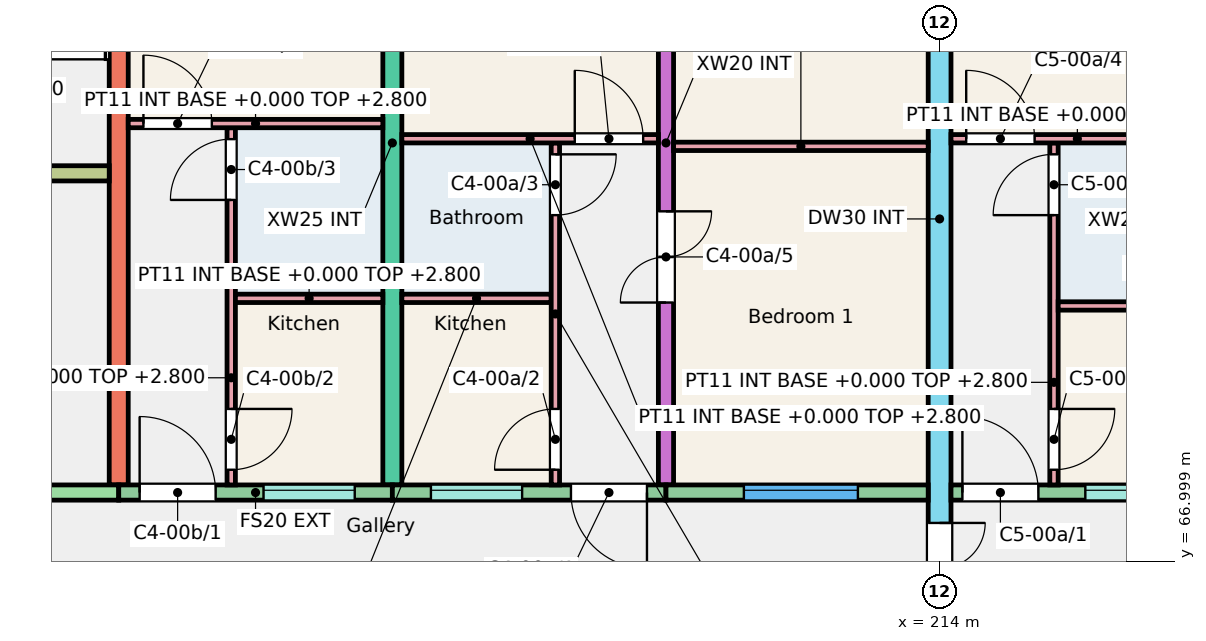
"""IFC4 building model, lengths in metres.
Left out: names, types, materials, properties, quantities, classifications, styles, units other than length and angle.
Written with IfcOpenShell. Run it as: python <this file> out.ifc"""

import sys

from ifc_helpers import new_model, si_unit, direction, frame, frame_2d, origin, place, context, subcontext, project, spatial, rectangle, extrude, element, fill, save


model = new_model("IFC4")
c1 = context("Model", 3, precision=1e-05, world=origin(), true_north=direction((0.0, 1.0)))
c2 = subcontext(c1, "Body", "Model", "MODEL_VIEW")
j1 = project(units=[si_unit("LENGTHUNIT", "METRE"), si_unit("PLANEANGLEUNIT", "RADIAN")], contexts=[c1])
p1 = place(None, origin())
s1 = spatial("IfcSite", under=j1, at=p1, CompositionType="ELEMENT")
p2 = place(p1, origin())
s2 = spatial("IfcBuilding", under=s1, at=p2, CompositionType="ELEMENT")
p3 = place(p2, origin())
s3 = spatial("IfcBuildingStorey", under=s2, at=p3, CompositionType="ELEMENT", Elevation=0.0)
for number, where, z_axis, x_axis in (
    (1, (203.2, 68.0, -0.25), (0.0, 0.0, 1.0), (0.0, 1.0, 0.0)),
    (2, (206.8, 68.0, -0.25), (0.0, 0.0, 1.0), (0.0, 1.0, 0.0)),
):
    element("IfcWall", number, at=place(p3, frame(where, z_axis=z_axis, x_axis=x_axis)), inside=s3, PredefinedType="SHEAR", context=c2, shape_type="SweptSolid", body=[
        extrude(rectangle(XDim=9.0, YDim=0.25, at=frame_2d((4.5, 0.0))), origin(), (0.0, 0.0, 1.0), 3.25),
    ])
p4 = place(p3, frame((210.4, 68.0, -0.25), z_axis=(0.0, 0.0, 1.0), x_axis=(0.0, 1.0, 0.0)))
e3 = element("IfcWall", 3, at=p4, inside=s3, PredefinedType="SHEAR", context=c2, shape_type="SweptSolid", body=[
    extrude(rectangle(XDim=9.0, YDim=0.2, at=frame_2d((4.5, 0.0))), origin(), (0.0, 0.0, 1.0), 3.25),
])
p5 = place(p4, frame((2.4, 0.0, 0.25)))
e4 = element("IfcOpeningElement", 4, at=p5, cuts=e3, PredefinedType="OPENING", context=c2, shape_type="SweptSolid", body=[
    extrude(rectangle(XDim=1.2, YDim=2.1, at=frame_2d((0.6, 1.05))), frame((0.0, 0.11, 0.0), z_axis=(0.0, -1.0, 0.0), x_axis=(1.0, 0.0, 0.0)), (0.0, 0.0, 1.0), 0.22),
])
p6 = place(p4, frame((6.4, 0.0, 0.25)))
e5 = element("IfcOpeningElement", 5, at=p6, cuts=e3, PredefinedType="OPENING", context=c2, shape_type="SweptSolid", body=[
    extrude(rectangle(XDim=1.2, YDim=2.1, at=frame_2d((0.6, 1.05))), frame((0.0, 0.11, 0.0), z_axis=(0.0, -1.0, 0.0), x_axis=(1.0, 0.0, 0.0)), (0.0, 0.0, 1.0), 0.22),
])
p7 = place(p3, frame((214.0, 66.0, -0.25), z_axis=(0.0, 0.0, 1.0), x_axis=(0.0, 1.0, 0.0)))
e6 = element("IfcWall", 6, at=p7, inside=s3, PredefinedType="SHEAR", context=c2, shape_type="SweptSolid", body=[
    extrude(rectangle(XDim=11.0, YDim=0.3, at=frame_2d((5.5, 0.0))), origin(), (0.0, 0.0, 1.0), 3.25),
])
p8 = place(p7, frame((0.3, 0.0, 0.25)))
e7 = element("IfcOpeningElement", 7, at=p8, cuts=e6, PredefinedType="OPENING", context=c2, shape_type="SweptSolid", body=[
    extrude(rectangle(XDim=1.2, YDim=2.1, at=frame_2d((0.6, 1.05))), frame((0.0, 0.16, 0.0), z_axis=(0.0, -1.0, 0.0), x_axis=(1.0, 0.0, 0.0)), (0.0, 0.0, 1.0), 0.32),
])
p9 = place(p3, frame((197.35, 67.9, -0.25), z_axis=(0.0, 0.0, 1.0), x_axis=(1.0, 0.0, 0.0)))
e8 = element("IfcWall", 8, at=p9, inside=s3, PredefinedType="SHEAR", context=c2, shape_type="SweptSolid", body=[
    extrude(rectangle(XDim=5.85, YDim=0.2, at=frame_2d((2.925, 0.0))), origin(), (0.0, 0.0, 1.0), 3.25),
])
p10 = place(p9, frame((2.312, 0.0, 0.25)))
e9 = element("IfcOpeningElement", 9, at=p10, cuts=e8, PredefinedType="OPENING", context=c2, shape_type="SweptSolid", body=[
    extrude(rectangle(XDim=1.1, YDim=2.1, at=frame_2d((0.55, 1.05))), frame((0.0, 0.11, 0.0), z_axis=(0.0, -1.0, 0.0), x_axis=(1.0, 0.0, 0.0)), (0.0, 0.0, 1.0), 0.22),
])
p11 = place(p3, frame((197.35, 72.1, -0.25), z_axis=(0.0, 0.0, 1.0), x_axis=(1.0, 0.0, 0.0)))
e10 = element("IfcWall", 10, at=p11, inside=s3, PredefinedType="SHEAR", context=c2, shape_type="SweptSolid", body=[
    extrude(rectangle(XDim=5.725, YDim=0.2, at=frame_2d((2.862, 0.0))), origin(), (0.0, 0.0, 1.0), 3.25),
])
p12 = place(p11, frame((3.775, 0.0, 0.25)))
e11 = element("IfcOpeningElement", 11, at=p12, cuts=e10, PredefinedType="OPENING", context=c2, shape_type="SweptSolid", body=[
    extrude(rectangle(XDim=1.0, YDim=2.1, at=frame_2d((0.5, 1.05))), frame((0.0, 0.11, 0.0), z_axis=(0.0, -1.0, 0.0), x_axis=(1.0, 0.0, 0.0)), (0.0, 0.0, 1.0), 0.22),
])
p13 = place(p11, frame((0.762, 0.0, 0.25)))
e12 = element("IfcOpeningElement", 12, at=p13, cuts=e10, PredefinedType="OPENING", context=c2, shape_type="SweptSolid", body=[
    extrude(rectangle(XDim=1.1, YDim=2.1, at=frame_2d((0.55, 1.05))), frame((0.0, 0.11, 0.0), z_axis=(0.0, -1.0, 0.0), x_axis=(1.0, 0.0, 0.0)), (0.0, 0.0, 1.0), 0.22),
])
p14 = place(p3, frame((203.2, 67.9, -0.25), z_axis=(0.0, 0.0, 1.0), x_axis=(1.0, 0.0, 0.0)))
e13 = element("IfcWall", 13, at=p14, inside=s3, PredefinedType="SOLIDWALL", context=c2, shape_type="SweptSolid", body=[
    extrude(rectangle(XDim=3.6, YDim=0.2, at=frame_2d((1.8, 0.0))), origin(), (0.0, 0.0, 1.0), 3.25),
])
p15 = place(p14, frame((1.905, 0.0, 1.35)))
e14 = element("IfcOpeningElement", 14, at=p15, cuts=e13, PredefinedType="OPENING", context=c2, shape_type="SweptSolid", body=[
    extrude(rectangle(XDim=1.2, YDim=1.3, at=frame_2d((0.6, 0.65))), frame((0.0, 0.11, 0.0), z_axis=(0.0, -1.0, 0.0), x_axis=(1.0, 0.0, 0.0)), (0.0, 0.0, 1.0), 0.22),
])
p16 = place(p14, frame((0.275, 0.0, 0.25)))
e15 = element("IfcOpeningElement", 15, at=p16, cuts=e13, PredefinedType="OPENING", context=c2, shape_type="SweptSolid", body=[
    extrude(rectangle(XDim=1.0, YDim=2.1, at=frame_2d((0.5, 1.05))), frame((0.0, 0.11, 0.0), z_axis=(0.0, -1.0, 0.0), x_axis=(1.0, 0.0, 0.0)), (0.0, 0.0, 1.0), 0.22),
])
p17 = place(p3, frame((206.8, 67.9, -0.25), z_axis=(0.0, 0.0, 1.0), x_axis=(1.0, 0.0, 0.0)))
e16 = element("IfcWall", 16, at=p17, inside=s3, PredefinedType="SOLIDWALL", context=c2, shape_type="SweptSolid", body=[
    extrude(rectangle(XDim=3.6, YDim=0.2, at=frame_2d((1.8, 0.0))), origin(), (0.0, 0.0, 1.0), 3.25),
])
p18 = place(p17, frame((0.508, 0.0, 1.35)))
e17 = element("IfcOpeningElement", 17, at=p18, cuts=e16, PredefinedType="OPENING", context=c2, shape_type="SweptSolid", body=[
    extrude(rectangle(XDim=1.2, YDim=1.3, at=frame_2d((0.6, 0.65))), frame((0.0, 0.11, 0.0), z_axis=(0.0, -1.0, 0.0), x_axis=(1.0, 0.0, 0.0)), (0.0, 0.0, 1.0), 0.22),
])
p19 = place(p17, frame((2.35, 0.0, 0.25)))
e18 = element("IfcOpeningElement", 18, at=p19, cuts=e16, PredefinedType="OPENING", context=c2, shape_type="SweptSolid", body=[
    extrude(rectangle(XDim=1.0, YDim=2.1, at=frame_2d((0.5, 1.05))), frame((0.0, 0.11, 0.0), z_axis=(0.0, -1.0, 0.0), x_axis=(1.0, 0.0, 0.0)), (0.0, 0.0, 1.0), 0.22),
])
p20 = place(p3, frame((210.4, 67.9, -0.25), z_axis=(0.0, 0.0, 1.0), x_axis=(1.0, 0.0, 0.0)))
e19 = element("IfcWall", 19, at=p20, inside=s3, PredefinedType="SOLIDWALL", context=c2, shape_type="SweptSolid", body=[
    extrude(rectangle(XDim=3.45, YDim=0.2, at=frame_2d((1.725, 0.0))), origin(), (0.0, 0.0, 1.0), 3.25),
])
p21 = place(p20, frame((1.025, 0.0, 1.15)))
e20 = element("IfcOpeningElement", 20, at=p21, cuts=e19, PredefinedType="OPENING", context=c2, shape_type="SweptSolid", body=[
    extrude(rectangle(XDim=1.5, YDim=1.5, at=frame_2d((0.75, 0.75))), frame((0.0, 0.11, 0.0), z_axis=(0.0, -1.0, 0.0), x_axis=(1.0, 0.0, 0.0)), (0.0, 0.0, 1.0), 0.22),
])
p22 = place(p3, frame((214.15, 67.9, -0.25), z_axis=(0.0, 0.0, 1.0), x_axis=(1.0, 0.0, 0.0)))
e21 = element("IfcWall", 21, at=p22, inside=s3, PredefinedType="SOLIDWALL", context=c2, shape_type="SweptSolid", body=[
    extrude(rectangle(XDim=3.45, YDim=0.2, at=frame_2d((1.725, 0.0))), origin(), (0.0, 0.0, 1.0), 3.25),
])
p23 = place(p22, frame((1.768, 0.0, 1.35)))
e22 = element("IfcOpeningElement", 22, at=p23, cuts=e21, PredefinedType="OPENING", context=c2, shape_type="SweptSolid", body=[
    extrude(rectangle(XDim=1.2, YDim=1.3, at=frame_2d((0.6, 0.65))), frame((0.0, 0.11, 0.0), z_axis=(0.0, -1.0, 0.0), x_axis=(1.0, 0.0, 0.0)), (0.0, 0.0, 1.0), 0.22),
])
p24 = place(p22, frame((0.15, 0.0, 0.25)))
e23 = element("IfcOpeningElement", 23, at=p24, cuts=e21, PredefinedType="OPENING", context=c2, shape_type="SweptSolid", body=[
    extrude(rectangle(XDim=1.0, YDim=2.1, at=frame_2d((0.5, 1.05))), frame((0.0, 0.11, 0.0), z_axis=(0.0, -1.0, 0.0), x_axis=(1.0, 0.0, 0.0)), (0.0, 0.0, 1.0), 0.22),
])
p25 = place(p3, frame((206.925, 70.455, 0.0), z_axis=(0.0, 0.0, 1.0), x_axis=(1.0, 0.0, 0.0)))
e24 = element("IfcWall", 24, at=p25, inside=s3, PredefinedType="PARTITIONING", context=c2, shape_type="SweptSolid", body=[
    extrude(rectangle(XDim=1.965, YDim=0.11, at=frame_2d((0.982, 0.0))), origin(), (0.0, 0.0, 1.0), 2.8),
])
p26 = place(p3, frame((208.945, 68.0, 0.0), z_axis=(0.0, 0.0, 1.0), x_axis=(0.0, 1.0, 0.0)))
e25 = element("IfcWall", 25, at=p26, inside=s3, PredefinedType="PARTITIONING", context=c2, shape_type="SweptSolid", body=[
    extrude(rectangle(XDim=4.5, YDim=0.11, at=frame_2d((2.25, 0.0))), origin(), (0.0, 0.0, 1.0), 2.8),
])
p27 = place(p26, frame((0.2, 0.0, 0.0)))
e26 = element("IfcOpeningElement", 26, at=p27, cuts=e25, PredefinedType="OPENING", context=c2, shape_type="SweptSolid", body=[
    extrude(rectangle(XDim=0.8, YDim=2.1, at=frame_2d((0.4, 1.05))), frame((0.0, 0.065, 0.0), z_axis=(0.0, -1.0, 0.0), x_axis=(1.0, 0.0, 0.0)), (0.0, 0.0, 1.0), 0.13),
])
p28 = place(p26, frame((3.55, 0.0, 0.0)))
e27 = element("IfcOpeningElement", 27, at=p28, cuts=e25, PredefinedType="OPENING", context=c2, shape_type="SweptSolid", body=[
    extrude(rectangle(XDim=0.8, YDim=2.1, at=frame_2d((0.4, 1.05))), frame((0.0, 0.065, 0.0), z_axis=(0.0, -1.0, 0.0), x_axis=(1.0, 0.0, 0.0)), (0.0, 0.0, 1.0), 0.13),
])
p29 = place(p3, frame((206.925, 72.555, 0.0), z_axis=(0.0, 0.0, 1.0), x_axis=(1.0, 0.0, 0.0)))
e28 = element("IfcWall", 28, at=p29, inside=s3, PredefinedType="PARTITIONING", context=c2, shape_type="SweptSolid", body=[
    extrude(rectangle(XDim=3.375, YDim=0.11, at=frame_2d((1.688, 0.0))), origin(), (0.0, 0.0, 1.0), 2.8),
])
p30 = place(p29, frame((2.275, 0.0, 0.0)))
e29 = element("IfcOpeningElement", 29, at=p30, cuts=e28, PredefinedType="OPENING", context=c2, shape_type="SweptSolid", body=[
    extrude(rectangle(XDim=0.9, YDim=2.1, at=frame_2d((0.45, 1.05))), frame((0.0, 0.065, 0.0), z_axis=(0.0, -1.0, 0.0), x_axis=(1.0, 0.0, 0.0)), (0.0, 0.0, 1.0), 0.13),
])
p31 = place(p3, frame((210.5, 72.455, 0.0), z_axis=(0.0, 0.0, 1.0), x_axis=(1.0, 0.0, 0.0)))
e30 = element("IfcWall", 30, at=p31, inside=s3, PredefinedType="PARTITIONING", context=c2, shape_type="SweptSolid", body=[
    extrude(rectangle(XDim=3.35, YDim=0.11, at=frame_2d((1.675, 0.0))), origin(), (0.0, 0.0, 1.0), 2.8),
])
p32 = place(p3, frame((204.68, 68.0, 0.0), z_axis=(0.0, 0.0, 1.0), x_axis=(0.0, 1.0, 0.0)))
e31 = element("IfcWall", 31, at=p32, inside=s3, PredefinedType="PARTITIONING", context=c2, shape_type="SweptSolid", body=[
    extrude(rectangle(XDim=4.7, YDim=0.11, at=frame_2d((2.35, 0.0))), origin(), (0.0, 0.0, 1.0), 2.8),
])
p33 = place(p32, frame((0.2, 0.0, 0.0)))
e32 = element("IfcOpeningElement", 32, at=p33, cuts=e31, PredefinedType="OPENING", context=c2, shape_type="SweptSolid", body=[
    extrude(rectangle(XDim=0.8, YDim=2.1, at=frame_2d((0.4, 1.05))), frame((0.0, 0.065, 0.0), z_axis=(0.0, -1.0, 0.0), x_axis=(1.0, 0.0, 0.0)), (0.0, 0.0, 1.0), 0.13),
])
p34 = place(p32, frame((3.75, 0.0, 0.0)))
e33 = element("IfcOpeningElement", 33, at=p34, cuts=e31, PredefinedType="OPENING", context=c2, shape_type="SweptSolid", body=[
    extrude(rectangle(XDim=0.8, YDim=2.1, at=frame_2d((0.4, 1.05))), frame((0.0, 0.065, 0.0), z_axis=(0.0, -1.0, 0.0), x_axis=(1.0, 0.0, 0.0)), (0.0, 0.0, 1.0), 0.13),
])
p35 = place(p3, frame((204.735, 70.455, 0.0), z_axis=(0.0, 0.0, 1.0), x_axis=(1.0, 0.0, 0.0)))
e34 = element("IfcWall", 34, at=p35, inside=s3, PredefinedType="PARTITIONING", context=c2, shape_type="SweptSolid", body=[
    extrude(rectangle(XDim=1.94, YDim=0.11, at=frame_2d((0.97, 0.0))), origin(), (0.0, 0.0, 1.0), 2.8),
])
p36 = place(p3, frame((203.325, 72.755, 0.0), z_axis=(0.0, 0.0, 1.0), x_axis=(1.0, 0.0, 0.0)))
e35 = element("IfcWall", 35, at=p36, inside=s3, PredefinedType="PARTITIONING", context=c2, shape_type="SweptSolid", body=[
    extrude(rectangle(XDim=3.35, YDim=0.11, at=frame_2d((1.675, 0.0))), origin(), (0.0, 0.0, 1.0), 2.8),
])
p37 = place(p36, frame((0.2, 0.0, 0.0)))
e36 = element("IfcOpeningElement", 36, at=p37, cuts=e35, PredefinedType="OPENING", context=c2, shape_type="SweptSolid", body=[
    extrude(rectangle(XDim=0.9, YDim=2.1, at=frame_2d((0.45, 1.05))), frame((0.0, 0.065, 0.0), z_axis=(0.0, -1.0, 0.0), x_axis=(1.0, 0.0, 0.0)), (0.0, 0.0, 1.0), 0.13),
])
p38 = place(p3, frame((215.505, 68.0, 0.0), z_axis=(0.0, 0.0, 1.0), x_axis=(0.0, 1.0, 0.0)))
e37 = element("IfcWall", 37, at=p38, inside=s3, PredefinedType="PARTITIONING", context=c2, shape_type="SweptSolid", body=[
    extrude(rectangle(XDim=4.5, YDim=0.11, at=frame_2d((2.25, 0.0))), origin(), (0.0, 0.0, 1.0), 2.8),
])
p39 = place(p38, frame((0.2, 0.0, 0.0)))
e38 = element("IfcOpeningElement", 38, at=p39, cuts=e37, PredefinedType="OPENING", context=c2, shape_type="SweptSolid", body=[
    extrude(rectangle(XDim=0.8, YDim=2.1, at=frame_2d((0.4, 1.05))), frame((0.0, 0.065, 0.0), z_axis=(0.0, -1.0, 0.0), x_axis=(1.0, 0.0, 0.0)), (0.0, 0.0, 1.0), 0.13),
])
p40 = place(p38, frame((3.55, 0.0, 0.0)))
e39 = element("IfcOpeningElement", 39, at=p40, cuts=e37, PredefinedType="OPENING", context=c2, shape_type="SweptSolid", body=[
    extrude(rectangle(XDim=0.8, YDim=2.1, at=frame_2d((0.4, 1.05))), frame((0.0, 0.065, 0.0), z_axis=(0.0, -1.0, 0.0), x_axis=(1.0, 0.0, 0.0)), (0.0, 0.0, 1.0), 0.13),
])
p41 = place(p3, frame((215.56, 70.355, 0.0), z_axis=(0.0, 0.0, 1.0), x_axis=(1.0, 0.0, 0.0)))
e40 = element("IfcWall", 40, at=p41, inside=s3, PredefinedType="PARTITIONING", context=c2, shape_type="SweptSolid", body=[
    extrude(rectangle(XDim=1.915, YDim=0.11, at=frame_2d((0.958, 0.0))), origin(), (0.0, 0.0, 1.0), 2.8),
])
p42 = place(p3, frame((214.15, 72.555, 0.0), z_axis=(0.0, 0.0, 1.0), x_axis=(1.0, 0.0, 0.0)))
e41 = element("IfcWall", 41, at=p42, inside=s3, PredefinedType="PARTITIONING", context=c2, shape_type="SweptSolid", body=[
    extrude(rectangle(XDim=3.325, YDim=0.11, at=frame_2d((1.663, 0.0))), origin(), (0.0, 0.0, 1.0), 2.8),
])
p43 = place(p42, frame((0.2, 0.0, 0.0)))
e42 = element("IfcOpeningElement", 42, at=p43, cuts=e41, PredefinedType="OPENING", context=c2, shape_type="SweptSolid", body=[
    extrude(rectangle(XDim=0.9, YDim=2.1, at=frame_2d((0.45, 1.05))), frame((0.0, 0.065, 0.0), z_axis=(0.0, -1.0, 0.0), x_axis=(1.0, 0.0, 0.0)), (0.0, 0.0, 1.0), 0.13),
])
p44 = place(p21, origin())
e43 = element("IfcWindow", 43, at=p44, inside=s3, PartitioningType="SINGLE_PANEL", PredefinedType="WINDOW", context=c2, shape_type="SweptSolid", body=[
    extrude(rectangle(XDim=1.5, YDim=1.5, at=frame_2d((0.75, 0.75))), frame((0.0, 0.06, 0.0), z_axis=(0.0, -1.0, 0.0), x_axis=(1.0, 0.0, 0.0)), (0.0, 0.0, 1.0), 0.06),
])
fill(e20, e43)
p45 = place(p18, origin())
e44 = element("IfcWindow", 44, at=p45, inside=s3, PartitioningType="SINGLE_PANEL", PredefinedType="WINDOW", context=c2, shape_type="SweptSolid", body=[
    extrude(rectangle(XDim=1.2, YDim=1.3, at=frame_2d((0.6, 0.65))), frame((0.0, 0.06, 0.0), z_axis=(0.0, -1.0, 0.0), x_axis=(1.0, 0.0, 0.0)), (0.0, 0.0, 1.0), 0.06),
])
fill(e17, e44)
p46 = place(p15, origin())
e45 = element("IfcWindow", 45, at=p46, inside=s3, PartitioningType="SINGLE_PANEL", PredefinedType="WINDOW", context=c2, shape_type="SweptSolid", body=[
    extrude(rectangle(XDim=1.2, YDim=1.3, at=frame_2d((0.6, 0.65))), frame((0.0, 0.06, 0.0), z_axis=(0.0, -1.0, 0.0), x_axis=(1.0, 0.0, 0.0)), (0.0, 0.0, 1.0), 0.06),
])
fill(e14, e45)
p47 = place(p23, origin())
e46 = element("IfcWindow", 46, at=p47, inside=s3, PartitioningType="SINGLE_PANEL", PredefinedType="WINDOW", context=c2, shape_type="SweptSolid", body=[
    extrude(rectangle(XDim=1.2, YDim=1.3, at=frame_2d((0.6, 0.65))), frame((0.0, 0.06, 0.0), z_axis=(0.0, -1.0, 0.0), x_axis=(1.0, 0.0, 0.0)), (0.0, 0.0, 1.0), 0.06),
])
fill(e22, e46)
p48 = place(p19, origin())
e47 = element("IfcDoor", 47, at=p48, inside=s3, OperationType="SINGLE_SWING_RIGHT", PredefinedType="DOOR", context=c2, shape_type="SweptSolid", body=[
    extrude(rectangle(XDim=1.0, YDim=2.1, at=frame_2d((0.5, 1.05))), frame((0.0, 0.025, 0.0), z_axis=(0.0, -1.0, 0.0), x_axis=(1.0, 0.0, 0.0)), (0.0, 0.0, 1.0), 0.05),
])
fill(e18, e47)
p49 = place(p27, origin())
e48 = element("IfcDoor", 48, at=p49, inside=s3, OperationType="SINGLE_SWING_LEFT", PredefinedType="DOOR", context=c2, shape_type="SweptSolid", body=[
    extrude(rectangle(XDim=0.8, YDim=2.1, at=frame_2d((0.4, 1.05))), frame((0.0, 0.025, 0.0), z_axis=(0.0, -1.0, 0.0), x_axis=(1.0, 0.0, 0.0)), (0.0, 0.0, 1.0), 0.05),
])
fill(e26, e48)
p50 = place(p28, origin())
e49 = element("IfcDoor", 49, at=p50, inside=s3, OperationType="SINGLE_SWING_RIGHT", PredefinedType="DOOR", context=c2, shape_type="SweptSolid", body=[
    extrude(rectangle(XDim=0.8, YDim=2.1, at=frame_2d((0.4, 1.05))), frame((0.0, 0.025, 0.0), z_axis=(0.0, -1.0, 0.0), x_axis=(1.0, 0.0, 0.0)), (0.0, 0.0, 1.0), 0.05),
])
fill(e27, e49)
p51 = place(p30, origin())
e50 = element("IfcDoor", 50, at=p51, inside=s3, OperationType="SINGLE_SWING_LEFT", PredefinedType="DOOR", context=c2, shape_type="SweptSolid", body=[
    extrude(rectangle(XDim=0.9, YDim=2.1, at=frame_2d((0.45, 1.05))), frame((0.0, 0.025, 0.0), z_axis=(0.0, -1.0, 0.0), x_axis=(1.0, 0.0, 0.0)), (0.0, 0.0, 1.0), 0.05),
])
fill(e29, e50)
p52 = place(p5, origin())
e51 = element("IfcDoor", 51, at=p52, inside=s3, OperationType="DOUBLE_DOOR_SINGLE_SWING", PredefinedType="DOOR", context=c2, shape_type="SweptSolid", body=[
    extrude(rectangle(XDim=1.2, YDim=2.1, at=frame_2d((0.6, 1.05))), frame((0.0, 0.025, 0.0), z_axis=(0.0, -1.0, 0.0), x_axis=(1.0, 0.0, 0.0)), (0.0, 0.0, 1.0), 0.05),
])
fill(e4, e51)
p53 = place(p16, origin())
e52 = element("IfcDoor", 52, at=p53, inside=s3, OperationType="SINGLE_SWING_LEFT", PredefinedType="DOOR", context=c2, shape_type="SweptSolid", body=[
    extrude(rectangle(XDim=1.0, YDim=2.1, at=frame_2d((0.5, 1.05))), frame((0.0, 0.025, 0.0), z_axis=(0.0, -1.0, 0.0), x_axis=(1.0, 0.0, 0.0)), (0.0, 0.0, 1.0), 0.05),
])
fill(e15, e52)
p54 = place(p33, origin())
e53 = element("IfcDoor", 53, at=p54, inside=s3, OperationType="SINGLE_SWING_RIGHT", PredefinedType="DOOR", context=c2, shape_type="SweptSolid", body=[
    extrude(rectangle(XDim=0.8, YDim=2.1, at=frame_2d((0.4, 1.05))), frame((0.0, 0.025, 0.0), z_axis=(0.0, -1.0, 0.0), x_axis=(1.0, 0.0, 0.0)), (0.0, 0.0, 1.0), 0.05),
])
fill(e32, e53)
p55 = place(p34, origin())
e54 = element("IfcDoor", 54, at=p55, inside=s3, OperationType="SINGLE_SWING_LEFT", PredefinedType="DOOR", context=c2, shape_type="SweptSolid", body=[
    extrude(rectangle(XDim=0.8, YDim=2.1, at=frame_2d((0.4, 1.05))), frame((0.0, 0.025, 0.0), z_axis=(0.0, -1.0, 0.0), x_axis=(1.0, 0.0, 0.0)), (0.0, 0.0, 1.0), 0.05),
])
fill(e33, e54)
p56 = place(p37, origin())
e55 = element("IfcDoor", 55, at=p56, inside=s3, OperationType="SINGLE_SWING_LEFT", PredefinedType="DOOR", context=c2, shape_type="SweptSolid", body=[
    extrude(rectangle(XDim=0.9, YDim=2.1, at=frame_2d((0.45, 1.05))), frame((0.0, 0.025, 0.0), z_axis=(0.0, -1.0, 0.0), x_axis=(1.0, 0.0, 0.0)), (0.0, 0.0, 1.0), 0.05),
])
fill(e36, e55)
p57 = place(p24, origin())
e56 = element("IfcDoor", 56, at=p57, inside=s3, OperationType="SINGLE_SWING_LEFT", PredefinedType="DOOR", context=c2, shape_type="SweptSolid", body=[
    extrude(rectangle(XDim=1.0, YDim=2.1, at=frame_2d((0.5, 1.05))), frame((0.0, 0.025, 0.0), z_axis=(0.0, -1.0, 0.0), x_axis=(1.0, 0.0, 0.0)), (0.0, 0.0, 1.0), 0.05),
])
fill(e23, e56)
p58 = place(p39, origin())
e57 = element("IfcDoor", 57, at=p58, inside=s3, OperationType="SINGLE_SWING_RIGHT", PredefinedType="DOOR", context=c2, shape_type="SweptSolid", body=[
    extrude(rectangle(XDim=0.8, YDim=2.1, at=frame_2d((0.4, 1.05))), frame((0.0, 0.025, 0.0), z_axis=(0.0, -1.0, 0.0), x_axis=(1.0, 0.0, 0.0)), (0.0, 0.0, 1.0), 0.05),
])
fill(e38, e57)
p59 = place(p40, origin())
e58 = element("IfcDoor", 58, at=p59, inside=s3, OperationType="SINGLE_SWING_LEFT", PredefinedType="DOOR", context=c2, shape_type="SweptSolid", body=[
    extrude(rectangle(XDim=0.8, YDim=2.1, at=frame_2d((0.4, 1.05))), frame((0.0, 0.025, 0.0), z_axis=(0.0, -1.0, 0.0), x_axis=(1.0, 0.0, 0.0)), (0.0, 0.0, 1.0), 0.05),
])
fill(e39, e58)
p60 = place(p43, origin())
e59 = element("IfcDoor", 59, at=p60, inside=s3, OperationType="SINGLE_SWING_LEFT", PredefinedType="DOOR", context=c2, shape_type="SweptSolid", body=[
    extrude(rectangle(XDim=0.9, YDim=2.1, at=frame_2d((0.45, 1.05))), frame((0.0, 0.025, 0.0), z_axis=(0.0, -1.0, 0.0), x_axis=(1.0, 0.0, 0.0)), (0.0, 0.0, 1.0), 0.05),
])
fill(e42, e59)
p61 = place(p8, origin())
e60 = element("IfcDoor", 60, at=p61, inside=s3, OperationType="DOUBLE_DOOR_SINGLE_SWING", PredefinedType="DOOR", context=c2, shape_type="SweptSolid", body=[
    extrude(rectangle(XDim=1.2, YDim=2.1, at=frame_2d((0.6, 1.05))), frame((0.0, 0.025, 0.0), z_axis=(0.0, -1.0, 0.0), x_axis=(1.0, 0.0, 0.0)), (0.0, 0.0, 1.0), 0.05),
])
fill(e7, e60)
save(model, sys.argv[1])
